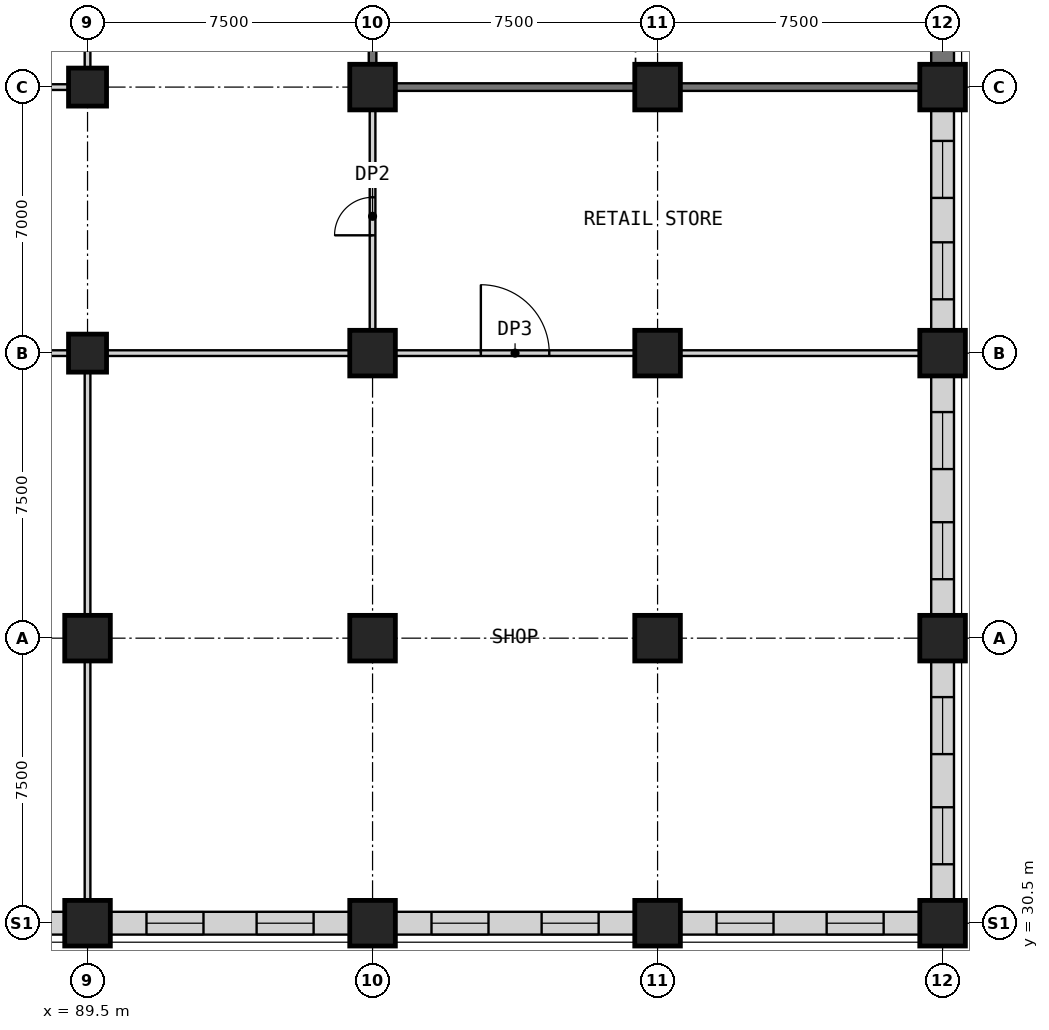
"""IFC4 building model, lengths in metres.
Left out: names, types, materials, properties, quantities, classifications, styles, units other than length and angle.
Written with IfcOpenShell. Run it as: python <this file> out.ifc"""

import sys

from ifc_helpers import new_model, si_unit, direction, frame, frame_2d, origin, origin_2d, place, context, subcontext, project, spatial, rectangle, extrude, element, fill, save


model = new_model("IFC4")
c1 = context("Model", 3, precision=1e-05, world=origin(), true_north=direction((0.0, 1.0)))
c2 = subcontext(c1, "Body", "Model", "MODEL_VIEW")
j1 = project(units=[si_unit("LENGTHUNIT", "METRE"), si_unit("PLANEANGLEUNIT", "RADIAN")], contexts=[c1])
p1 = place(None, origin())
s1 = spatial("IfcSite", under=j1, at=p1, CompositionType="ELEMENT")
p2 = place(p1, origin())
s2 = spatial("IfcBuilding", under=s1, at=p2, CompositionType="ELEMENT")
p3 = place(p2, frame((0.0, 0.0, 13.5)))
s3 = spatial("IfcBuildingStorey", under=s2, at=p3, CompositionType="ELEMENT", Elevation=13.5)
for number, where, z_axis, x_axis in (
    (1, (89.5, 45.5, 0.0), (0.0, 0.0, 1.0), (1.0, 0.0, 0.0)),
    (2, (89.5, 52.5, 0.0), (0.0, 0.0, 1.0), (1.0, 0.0, 0.0)),
):
    element("IfcColumn", number, at=place(p3, frame(where, z_axis=z_axis, x_axis=x_axis)), inside=s3, PredefinedType="COLUMN", context=c2, shape_type="SweptSolid", body=[
        extrude(rectangle(XDim=1.0, YDim=1.0, at=origin_2d()), origin(), (0.0, 0.0, 1.0), 5.0),
    ])
for number, where, z_axis, x_axis in (
    (3, (89.5, 30.5, 0.0), (0.0, 0.0, 1.0), (1.0, 0.0, 0.0)),
    (4, (89.5, 38.0, 0.0), (0.0, 0.0, 1.0), (1.0, 0.0, 0.0)),
    (5, (97.0, 30.5, 0.0), (0.0, 0.0, 1.0), (1.0, 0.0, 0.0)),
    (6, (97.0, 38.0, 0.0), (0.0, 0.0, 1.0), (1.0, 0.0, 0.0)),
    (7, (97.0, 45.5, 0.0), (0.0, 0.0, 1.0), (1.0, 0.0, 0.0)),
    (8, (97.0, 52.5, 0.0), (0.0, 0.0, 1.0), (1.0, 0.0, 0.0)),
    (9, (104.5, 30.5, 0.0), (0.0, 0.0, 1.0), (1.0, 0.0, 0.0)),
    (10, (104.5, 38.0, 0.0), (0.0, 0.0, 1.0), (1.0, 0.0, 0.0)),
    (11, (104.5, 45.5, 0.0), (0.0, 0.0, 1.0), (1.0, 0.0, 0.0)),
    (12, (104.5, 52.5, 0.0), (0.0, 0.0, 1.0), (1.0, 0.0, 0.0)),
    (13, (112.0, 30.5, 0.0), (0.0, 0.0, 1.0), (1.0, 0.0, 0.0)),
    (14, (112.0, 38.0, 0.0), (0.0, 0.0, 1.0), (1.0, 0.0, 0.0)),
    (15, (112.0, 45.5, 0.0), (0.0, 0.0, 1.0), (1.0, 0.0, 0.0)),
    (16, (112.0, 52.5, 0.0), (0.0, 0.0, 1.0), (1.0, 0.0, 0.0)),
):
    element("IfcColumn", number, at=place(p3, frame(where, z_axis=z_axis, x_axis=x_axis)), inside=s3, PredefinedType="COLUMN", context=c2, shape_type="SweptSolid", body=[
        extrude(rectangle(XDim=1.2, YDim=1.2, at=origin_2d()), origin(), (0.0, 0.0, 1.0), 5.0),
    ])
p4 = place(p3, frame((82.6, 30.5, 0.0), z_axis=(0.0, 0.0, 1.0), x_axis=(1.0, 0.0, 0.0)))
e17 = element("IfcWall", 17, at=p4, inside=s3, PredefinedType="PARTITIONING", context=c2, shape_type="SweptSolid", body=[
    extrude(rectangle(XDim=6.3, YDim=0.6, at=frame_2d((3.15, 0.0))), origin(), (0.0, 0.0, 1.0), 4.1),
])
p5 = place(p4, frame((0.951, 0.0, 0.9)))
e18 = element("IfcOpeningElement", 18, at=p5, cuts=e17, PredefinedType="OPENING", context=c2, shape_type="SweptSolid", body=[
    extrude(rectangle(XDim=1.5, YDim=2.8, at=frame_2d((0.75, 1.4))), frame((0.0, 0.31, 0.0), z_axis=(0.0, -1.0, 0.0), x_axis=(1.0, 0.0, 0.0)), (0.0, 0.0, 1.0), 0.62),
])
p6 = place(p4, frame((3.849, 0.0, 0.9)))
e19 = element("IfcOpeningElement", 19, at=p6, cuts=e17, PredefinedType="OPENING", context=c2, shape_type="SweptSolid", body=[
    extrude(rectangle(XDim=1.5, YDim=2.8, at=frame_2d((0.75, 1.4))), frame((0.0, 0.31, 0.0), z_axis=(0.0, -1.0, 0.0), x_axis=(1.0, 0.0, 0.0)), (0.0, 0.0, 1.0), 0.62),
])
p7 = place(p3, frame((90.1, 30.5, 0.0), z_axis=(0.0, 0.0, 1.0), x_axis=(1.0, 0.0, 0.0)))
e20 = element("IfcWall", 20, at=p7, inside=s3, PredefinedType="PARTITIONING", context=c2, shape_type="SweptSolid", body=[
    extrude(rectangle(XDim=6.3, YDim=0.6, at=frame_2d((3.15, 0.0))), origin(), (0.0, 0.0, 1.0), 4.1),
])
p8 = place(p7, frame((0.951, 0.0, 0.9)))
e21 = element("IfcOpeningElement", 21, at=p8, cuts=e20, PredefinedType="OPENING", context=c2, shape_type="SweptSolid", body=[
    extrude(rectangle(XDim=1.5, YDim=2.8, at=frame_2d((0.75, 1.4))), frame((0.0, 0.31, 0.0), z_axis=(0.0, -1.0, 0.0), x_axis=(1.0, 0.0, 0.0)), (0.0, 0.0, 1.0), 0.62),
])
p9 = place(p7, frame((3.849, 0.0, 0.9)))
e22 = element("IfcOpeningElement", 22, at=p9, cuts=e20, PredefinedType="OPENING", context=c2, shape_type="SweptSolid", body=[
    extrude(rectangle(XDim=1.5, YDim=2.8, at=frame_2d((0.75, 1.4))), frame((0.0, 0.31, 0.0), z_axis=(0.0, -1.0, 0.0), x_axis=(1.0, 0.0, 0.0)), (0.0, 0.0, 1.0), 0.62),
])
p10 = place(p3, frame((97.6, 30.5, 0.0), z_axis=(0.0, 0.0, 1.0), x_axis=(1.0, 0.0, 0.0)))
e23 = element("IfcWall", 23, at=p10, inside=s3, PredefinedType="PARTITIONING", context=c2, shape_type="SweptSolid", body=[
    extrude(rectangle(XDim=6.3, YDim=0.6, at=frame_2d((3.15, 0.0))), origin(), (0.0, 0.0, 1.0), 4.1),
])
p11 = place(p10, frame((0.951, 0.0, 0.9)))
e24 = element("IfcOpeningElement", 24, at=p11, cuts=e23, PredefinedType="OPENING", context=c2, shape_type="SweptSolid", body=[
    extrude(rectangle(XDim=1.5, YDim=2.8, at=frame_2d((0.75, 1.4))), frame((0.0, 0.31, 0.0), z_axis=(0.0, -1.0, 0.0), x_axis=(1.0, 0.0, 0.0)), (0.0, 0.0, 1.0), 0.62),
])
p12 = place(p10, frame((3.849, 0.0, 0.9)))
e25 = element("IfcOpeningElement", 25, at=p12, cuts=e23, PredefinedType="OPENING", context=c2, shape_type="SweptSolid", body=[
    extrude(rectangle(XDim=1.5, YDim=2.8, at=frame_2d((0.75, 1.4))), frame((0.0, 0.31, 0.0), z_axis=(0.0, -1.0, 0.0), x_axis=(1.0, 0.0, 0.0)), (0.0, 0.0, 1.0), 0.62),
])
p13 = place(p3, frame((105.1, 30.5, 0.0), z_axis=(0.0, 0.0, 1.0), x_axis=(1.0, 0.0, 0.0)))
e26 = element("IfcWall", 26, at=p13, inside=s3, PredefinedType="PARTITIONING", context=c2, shape_type="SweptSolid", body=[
    extrude(rectangle(XDim=6.3, YDim=0.6, at=frame_2d((3.15, 0.0))), origin(), (0.0, 0.0, 1.0), 4.1),
])
p14 = place(p13, frame((0.951, 0.0, 0.9)))
e27 = element("IfcOpeningElement", 27, at=p14, cuts=e26, PredefinedType="OPENING", context=c2, shape_type="SweptSolid", body=[
    extrude(rectangle(XDim=1.5, YDim=2.8, at=frame_2d((0.75, 1.4))), frame((0.0, 0.31, 0.0), z_axis=(0.0, -1.0, 0.0), x_axis=(1.0, 0.0, 0.0)), (0.0, 0.0, 1.0), 0.62),
])
p15 = place(p13, frame((3.849, 0.0, 0.9)))
e28 = element("IfcOpeningElement", 28, at=p15, cuts=e26, PredefinedType="OPENING", context=c2, shape_type="SweptSolid", body=[
    extrude(rectangle(XDim=1.5, YDim=2.8, at=frame_2d((0.75, 1.4))), frame((0.0, 0.31, 0.0), z_axis=(0.0, -1.0, 0.0), x_axis=(1.0, 0.0, 0.0)), (0.0, 0.0, 1.0), 0.62),
])
for number, where, z_axis, x_axis in (
    (29, (82.6, 45.5, 0.0), (0.0, 0.0, 1.0), (1.0, 0.0, 0.0)),
    (30, (90.0, 45.5, 0.0), (0.0, 0.0, 1.0), (1.0, 0.0, 0.0)),
):
    element("IfcWall", number, at=place(p3, frame(where, z_axis=z_axis, x_axis=x_axis)), inside=s3, PredefinedType="PARTITIONING", context=c2, shape_type="SweptSolid", body=[
        extrude(rectangle(XDim=6.4, YDim=0.15, at=frame_2d((3.2, 0.0))), origin(), (0.0, 0.0, 1.0), 4.7),
    ])
p16 = place(p3, frame((97.6, 45.5, 0.0), z_axis=(0.0, 0.0, 1.0), x_axis=(1.0, 0.0, 0.0)))
e31 = element("IfcWall", 31, at=p16, inside=s3, PredefinedType="PARTITIONING", context=c2, shape_type="SweptSolid", body=[
    extrude(rectangle(XDim=6.3, YDim=0.15, at=frame_2d((3.15, 0.0))), origin(), (0.0, 0.0, 1.0), 4.7),
])
p17 = place(p16, frame((2.25, 0.0, 0.0)))
e32 = element("IfcOpeningElement", 32, at=p17, cuts=e31, PredefinedType="OPENING", context=c2, shape_type="SweptSolid", body=[
    extrude(rectangle(XDim=1.8, YDim=2.4, at=frame_2d((0.9, 1.2))), frame((0.0, 0.085, 0.0), z_axis=(0.0, -1.0, 0.0), x_axis=(1.0, 0.0, 0.0)), (0.0, 0.0, 1.0), 0.17),
])
p18 = place(p3, frame((105.1, 45.5, 0.0), z_axis=(0.0, 0.0, 1.0), x_axis=(1.0, 0.0, 0.0)))
e33 = element("IfcWall", 33, at=p18, inside=s3, PredefinedType="PARTITIONING", context=c2, shape_type="SweptSolid", body=[
    extrude(rectangle(XDim=6.3, YDim=0.15, at=frame_2d((3.15, 0.0))), origin(), (0.0, 0.0, 1.0), 4.7),
])
p19 = place(p3, frame((89.0, 52.5, 0.0), z_axis=(0.0, 0.0, 1.0), x_axis=(-1.0, 0.0, 0.0)))
e34 = element("IfcWall", 34, at=p19, inside=s3, PredefinedType="PARTITIONING", context=c2, shape_type="SweptSolid", body=[
    extrude(rectangle(XDim=6.4, YDim=0.15, at=frame_2d((3.2, 0.0))), origin(), (0.0, 0.0, 1.0), 4.7),
])
p20 = place(p19, frame((2.35, 0.0, 0.0)))
e35 = element("IfcOpeningElement", 35, at=p20, cuts=e34, PredefinedType="OPENING", context=c2, shape_type="SweptSolid", body=[
    extrude(rectangle(XDim=1.8, YDim=2.4, at=frame_2d((0.9, 1.2))), frame((0.0, 0.085, 0.0), z_axis=(0.0, -1.0, 0.0), x_axis=(1.0, 0.0, 0.0)), (0.0, 0.0, 1.0), 0.17),
])
for number, where, z_axis, x_axis in (
    (36, (97.6, 52.5, 0.0), (0.0, 0.0, 1.0), (1.0, 0.0, 0.0)),
    (37, (105.1, 52.5, 0.0), (0.0, 0.0, 1.0), (1.0, 0.0, 0.0)),
):
    element("IfcWall", number, at=place(p3, frame(where, z_axis=z_axis, x_axis=x_axis)), inside=s3, PredefinedType="SHEAR", context=c2, shape_type="SweptSolid", body=[
        extrude(rectangle(XDim=6.3, YDim=0.2, at=frame_2d((3.15, 0.0))), origin(), (0.0, 0.0, 1.0), 4.7),
    ])
p21 = place(p3, frame((97.0, 46.1, 0.0), z_axis=(0.0, 0.0, 1.0), x_axis=(0.0, 1.0, 0.0)))
e38 = element("IfcWall", 38, at=p21, inside=s3, PredefinedType="PARTITIONING", context=c2, shape_type="SweptSolid", body=[
    extrude(rectangle(XDim=5.8, YDim=0.15, at=frame_2d((2.9, 0.0))), origin(), (0.0, 0.0, 1.0), 4.7),
])
p22 = place(p21, frame((2.5, 0.0, 0.0)))
e39 = element("IfcOpeningElement", 39, at=p22, cuts=e38, PredefinedType="OPENING", context=c2, shape_type="SweptSolid", body=[
    extrude(rectangle(XDim=1.0, YDim=2.1, at=frame_2d((0.5, 1.05))), frame((0.0, 0.085, 0.0), z_axis=(0.0, -1.0, 0.0), x_axis=(1.0, 0.0, 0.0)), (0.0, 0.0, 1.0), 0.17),
])
p23 = place(p3, frame((97.0, 59.4, 0.0), z_axis=(0.0, 0.0, 1.0), x_axis=(0.0, -1.0, 0.0)))
e40 = element("IfcWall", 40, at=p23, inside=s3, PredefinedType="SHEAR", context=c2, shape_type="SweptSolid", body=[
    extrude(rectangle(XDim=6.3, YDim=0.2, at=frame_2d((3.15, 0.0))), origin(), (0.0, 0.0, 1.0), 4.7),
])
p24 = place(p23, frame((2.6, 0.0, 0.0)))
e41 = element("IfcOpeningElement", 41, at=p24, cuts=e40, PredefinedType="OPENING", context=c2, shape_type="SweptSolid", body=[
    extrude(rectangle(XDim=1.2, YDim=2.1, at=frame_2d((0.6, 1.05))), frame((0.0, 0.11, 0.0), z_axis=(0.0, -1.0, 0.0), x_axis=(1.0, 0.0, 0.0)), (0.0, 0.0, 1.0), 0.22),
])
p25 = place(p3, frame((112.0, 31.1, 0.0), z_axis=(0.0, 0.0, 1.0), x_axis=(0.0, 1.0, 0.0)))
e42 = element("IfcWall", 42, at=p25, inside=s3, PredefinedType="PARTITIONING", context=c2, shape_type="SweptSolid", body=[
    extrude(rectangle(XDim=6.3, YDim=0.6, at=frame_2d((3.15, 0.0))), origin(), (0.0, 0.0, 1.0), 4.1),
])
p26 = place(p25, frame((0.951, 0.0, 0.9)))
e43 = element("IfcOpeningElement", 43, at=p26, cuts=e42, PredefinedType="OPENING", context=c2, shape_type="SweptSolid", body=[
    extrude(rectangle(XDim=1.5, YDim=2.8, at=frame_2d((0.75, 1.4))), frame((0.0, 0.31, 0.0), z_axis=(0.0, -1.0, 0.0), x_axis=(1.0, 0.0, 0.0)), (0.0, 0.0, 1.0), 0.62),
])
p27 = place(p25, frame((3.849, 0.0, 0.9)))
e44 = element("IfcOpeningElement", 44, at=p27, cuts=e42, PredefinedType="OPENING", context=c2, shape_type="SweptSolid", body=[
    extrude(rectangle(XDim=1.5, YDim=2.8, at=frame_2d((0.75, 1.4))), frame((0.0, 0.31, 0.0), z_axis=(0.0, -1.0, 0.0), x_axis=(1.0, 0.0, 0.0)), (0.0, 0.0, 1.0), 0.62),
])
p28 = place(p3, frame((112.0, 38.6, 0.0), z_axis=(0.0, 0.0, 1.0), x_axis=(0.0, 1.0, 0.0)))
e45 = element("IfcWall", 45, at=p28, inside=s3, PredefinedType="PARTITIONING", context=c2, shape_type="SweptSolid", body=[
    extrude(rectangle(XDim=6.3, YDim=0.6, at=frame_2d((3.15, 0.0))), origin(), (0.0, 0.0, 1.0), 4.1),
])
p29 = place(p28, frame((0.951, 0.0, 0.9)))
e46 = element("IfcOpeningElement", 46, at=p29, cuts=e45, PredefinedType="OPENING", context=c2, shape_type="SweptSolid", body=[
    extrude(rectangle(XDim=1.5, YDim=2.8, at=frame_2d((0.75, 1.4))), frame((0.0, 0.31, 0.0), z_axis=(0.0, -1.0, 0.0), x_axis=(1.0, 0.0, 0.0)), (0.0, 0.0, 1.0), 0.62),
])
p30 = place(p28, frame((3.849, 0.0, 0.9)))
e47 = element("IfcOpeningElement", 47, at=p30, cuts=e45, PredefinedType="OPENING", context=c2, shape_type="SweptSolid", body=[
    extrude(rectangle(XDim=1.5, YDim=2.8, at=frame_2d((0.75, 1.4))), frame((0.0, 0.31, 0.0), z_axis=(0.0, -1.0, 0.0), x_axis=(1.0, 0.0, 0.0)), (0.0, 0.0, 1.0), 0.62),
])
p31 = place(p3, frame((112.0, 46.1, 0.0), z_axis=(0.0, 0.0, 1.0), x_axis=(0.0, 1.0, 0.0)))
e48 = element("IfcWall", 48, at=p31, inside=s3, PredefinedType="PARTITIONING", context=c2, shape_type="SweptSolid", body=[
    extrude(rectangle(XDim=5.8, YDim=0.6, at=frame_2d((2.9, 0.0))), origin(), (0.0, 0.0, 1.0), 4.1),
])
p32 = place(p31, frame((0.816, 0.0, 0.9)))
e49 = element("IfcOpeningElement", 49, at=p32, cuts=e48, PredefinedType="OPENING", context=c2, shape_type="SweptSolid", body=[
    extrude(rectangle(XDim=1.5, YDim=2.8, at=frame_2d((0.75, 1.4))), frame((0.0, 0.31, 0.0), z_axis=(0.0, -1.0, 0.0), x_axis=(1.0, 0.0, 0.0)), (0.0, 0.0, 1.0), 0.62),
])
p33 = place(p31, frame((3.484, 0.0, 0.9)))
e50 = element("IfcOpeningElement", 50, at=p33, cuts=e48, PredefinedType="OPENING", context=c2, shape_type="SweptSolid", body=[
    extrude(rectangle(XDim=1.5, YDim=2.8, at=frame_2d((0.75, 1.4))), frame((0.0, 0.31, 0.0), z_axis=(0.0, -1.0, 0.0), x_axis=(1.0, 0.0, 0.0)), (0.0, 0.0, 1.0), 0.62),
])
p34 = place(p3, frame((112.0, 53.1, 0.0), z_axis=(0.0, 0.0, 1.0), x_axis=(0.0, 1.0, 0.0)))
e51 = element("IfcWall", 51, at=p34, inside=s3, PredefinedType="PARTITIONING", context=c2, shape_type="SweptSolid", body=[
    extrude(rectangle(XDim=6.3, YDim=0.6, at=frame_2d((3.15, 0.0))), origin(), (0.0, 0.0, 1.0), 4.1),
])
p35 = place(p3, frame((89.5, 31.1, 0.0), z_axis=(0.0, 0.0, 1.0), x_axis=(0.0, 1.0, 0.0)))
e52 = element("IfcWall", 52, at=p35, inside=s3, PredefinedType="PARTITIONING", context=c2, shape_type="SweptSolid", body=[
    extrude(rectangle(XDim=6.3, YDim=0.15, at=frame_2d((3.15, 0.0))), origin(), (0.0, 0.0, 1.0), 4.7),
])
p36 = place(p3, frame((89.5, 38.6, 0.0), z_axis=(0.0, 0.0, 1.0), x_axis=(0.0, 1.0, 0.0)))
e53 = element("IfcWall", 53, at=p36, inside=s3, PredefinedType="PARTITIONING", context=c2, shape_type="SweptSolid", body=[
    extrude(rectangle(XDim=6.4, YDim=0.15, at=frame_2d((3.2, 0.0))), origin(), (0.0, 0.0, 1.0), 4.7),
])
p37 = place(p3, frame((89.5, 53.0, 0.0), z_axis=(0.0, 0.0, 1.0), x_axis=(0.0, 1.0, 0.0)))
e54 = element("IfcWall", 54, at=p37, inside=s3, PredefinedType="PARTITIONING", context=c2, shape_type="SweptSolid", body=[
    extrude(rectangle(XDim=6.5, YDim=0.15, at=frame_2d((3.25, 0.0))), origin(), (0.0, 0.0, 1.0), 4.7),
])
p38 = place(p8, origin())
e55 = element("IfcWindow", 55, at=p38, inside=s3, PartitioningType="SINGLE_PANEL", PredefinedType="WINDOW", context=c2, shape_type="SweptSolid", body=[
    extrude(rectangle(XDim=1.5, YDim=2.8, at=frame_2d((0.75, 1.4))), frame((0.0, 0.03, 0.0), z_axis=(0.0, -1.0, 0.0), x_axis=(1.0, 0.0, 0.0)), (0.0, 0.0, 1.0), 0.06),
])
fill(e21, e55)
p39 = place(p9, origin())
e56 = element("IfcWindow", 56, at=p39, inside=s3, PartitioningType="SINGLE_PANEL", PredefinedType="WINDOW", context=c2, shape_type="SweptSolid", body=[
    extrude(rectangle(XDim=1.5, YDim=2.8, at=frame_2d((0.75, 1.4))), frame((0.0, 0.03, 0.0), z_axis=(0.0, -1.0, 0.0), x_axis=(1.0, 0.0, 0.0)), (0.0, 0.0, 1.0), 0.06),
])
fill(e22, e56)
p40 = place(p11, origin())
e57 = element("IfcWindow", 57, at=p40, inside=s3, PartitioningType="SINGLE_PANEL", PredefinedType="WINDOW", context=c2, shape_type="SweptSolid", body=[
    extrude(rectangle(XDim=1.5, YDim=2.8, at=frame_2d((0.75, 1.4))), frame((0.0, 0.03, 0.0), z_axis=(0.0, -1.0, 0.0), x_axis=(1.0, 0.0, 0.0)), (0.0, 0.0, 1.0), 0.06),
])
fill(e24, e57)
p41 = place(p12, origin())
e58 = element("IfcWindow", 58, at=p41, inside=s3, PartitioningType="SINGLE_PANEL", PredefinedType="WINDOW", context=c2, shape_type="SweptSolid", body=[
    extrude(rectangle(XDim=1.5, YDim=2.8, at=frame_2d((0.75, 1.4))), frame((0.0, 0.03, 0.0), z_axis=(0.0, -1.0, 0.0), x_axis=(1.0, 0.0, 0.0)), (0.0, 0.0, 1.0), 0.06),
])
fill(e25, e58)
p42 = place(p14, origin())
e59 = element("IfcWindow", 59, at=p42, inside=s3, PartitioningType="SINGLE_PANEL", PredefinedType="WINDOW", context=c2, shape_type="SweptSolid", body=[
    extrude(rectangle(XDim=1.5, YDim=2.8, at=frame_2d((0.75, 1.4))), frame((0.0, 0.03, 0.0), z_axis=(0.0, -1.0, 0.0), x_axis=(1.0, 0.0, 0.0)), (0.0, 0.0, 1.0), 0.06),
])
fill(e27, e59)
p43 = place(p15, origin())
e60 = element("IfcWindow", 60, at=p43, inside=s3, PartitioningType="SINGLE_PANEL", PredefinedType="WINDOW", context=c2, shape_type="SweptSolid", body=[
    extrude(rectangle(XDim=1.5, YDim=2.8, at=frame_2d((0.75, 1.4))), frame((0.0, 0.03, 0.0), z_axis=(0.0, -1.0, 0.0), x_axis=(1.0, 0.0, 0.0)), (0.0, 0.0, 1.0), 0.06),
])
fill(e28, e60)
p44 = place(p17, origin())
e61 = element("IfcDoor", 61, at=p44, inside=s3, OperationType="SINGLE_SWING_LEFT", PredefinedType="DOOR", context=c2, shape_type="SweptSolid", body=[
    extrude(rectangle(XDim=1.8, YDim=2.4, at=frame_2d((0.9, 1.2))), frame((0.0, 0.025, 0.0), z_axis=(0.0, -1.0, 0.0), x_axis=(1.0, 0.0, 0.0)), (0.0, 0.0, 1.0), 0.05),
])
fill(e32, e61)
p45 = place(p22, origin())
e62 = element("IfcDoor", 62, at=p45, inside=s3, OperationType="SINGLE_SWING_LEFT", PredefinedType="DOOR", context=c2, shape_type="SweptSolid", body=[
    extrude(rectangle(XDim=1.0, YDim=2.1, at=frame_2d((0.5, 1.05))), frame((0.0, 0.025, 0.0), z_axis=(0.0, -1.0, 0.0), x_axis=(1.0, 0.0, 0.0)), (0.0, 0.0, 1.0), 0.05),
])
fill(e39, e62)
p46 = place(p26, origin())
e63 = element("IfcWindow", 63, at=p46, inside=s3, PartitioningType="SINGLE_PANEL", PredefinedType="WINDOW", context=c2, shape_type="SweptSolid", body=[
    extrude(rectangle(XDim=1.5, YDim=2.8, at=frame_2d((0.75, 1.4))), frame((0.0, 0.03, 0.0), z_axis=(0.0, -1.0, 0.0), x_axis=(1.0, 0.0, 0.0)), (0.0, 0.0, 1.0), 0.06),
])
fill(e43, e63)
p47 = place(p27, origin())
e64 = element("IfcWindow", 64, at=p47, inside=s3, PartitioningType="SINGLE_PANEL", PredefinedType="WINDOW", context=c2, shape_type="SweptSolid", body=[
    extrude(rectangle(XDim=1.5, YDim=2.8, at=frame_2d((0.75, 1.4))), frame((0.0, 0.03, 0.0), z_axis=(0.0, -1.0, 0.0), x_axis=(1.0, 0.0, 0.0)), (0.0, 0.0, 1.0), 0.06),
])
fill(e44, e64)
p48 = place(p29, origin())
e65 = element("IfcWindow", 65, at=p48, inside=s3, PartitioningType="SINGLE_PANEL", PredefinedType="WINDOW", context=c2, shape_type="SweptSolid", body=[
    extrude(rectangle(XDim=1.5, YDim=2.8, at=frame_2d((0.75, 1.4))), frame((0.0, 0.03, 0.0), z_axis=(0.0, -1.0, 0.0), x_axis=(1.0, 0.0, 0.0)), (0.0, 0.0, 1.0), 0.06),
])
fill(e46, e65)
p49 = place(p30, origin())
e66 = element("IfcWindow", 66, at=p49, inside=s3, PartitioningType="SINGLE_PANEL", PredefinedType="WINDOW", context=c2, shape_type="SweptSolid", body=[
    extrude(rectangle(XDim=1.5, YDim=2.8, at=frame_2d((0.75, 1.4))), frame((0.0, 0.03, 0.0), z_axis=(0.0, -1.0, 0.0), x_axis=(1.0, 0.0, 0.0)), (0.0, 0.0, 1.0), 0.06),
])
fill(e47, e66)
p50 = place(p32, origin())
e67 = element("IfcWindow", 67, at=p50, inside=s3, PartitioningType="SINGLE_PANEL", PredefinedType="WINDOW", context=c2, shape_type="SweptSolid", body=[
    extrude(rectangle(XDim=1.5, YDim=2.8, at=frame_2d((0.75, 1.4))), frame((0.0, 0.03, 0.0), z_axis=(0.0, -1.0, 0.0), x_axis=(1.0, 0.0, 0.0)), (0.0, 0.0, 1.0), 0.06),
])
fill(e49, e67)
p51 = place(p33, origin())
e68 = element("IfcWindow", 68, at=p51, inside=s3, PartitioningType="SINGLE_PANEL", PredefinedType="WINDOW", context=c2, shape_type="SweptSolid", body=[
    extrude(rectangle(XDim=1.5, YDim=2.8, at=frame_2d((0.75, 1.4))), frame((0.0, 0.03, 0.0), z_axis=(0.0, -1.0, 0.0), x_axis=(1.0, 0.0, 0.0)), (0.0, 0.0, 1.0), 0.06),
])
fill(e50, e68)
save(model, sys.argv[1])
